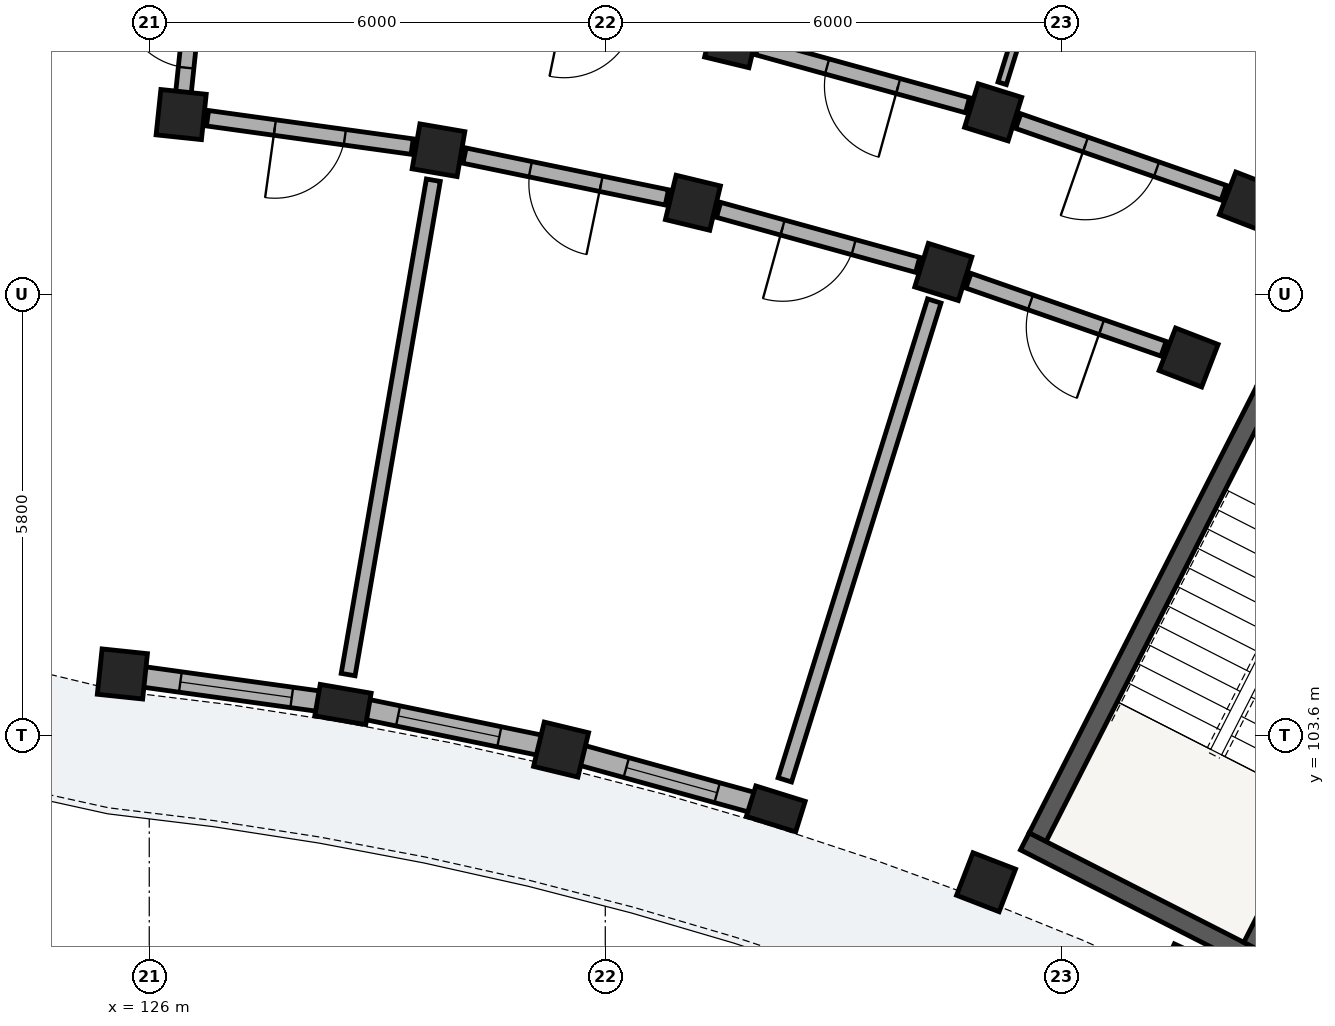
"""IFC4 building model, lengths in metres.
Left out: names, types, materials, properties, quantities, classifications, styles, units other than length and angle.
Written with IfcOpenShell. Run it as: python <this file> out.ifc"""

import sys

from ifc_helpers import new_model, si_unit, direction, frame, frame_2d, origin, origin_2d, place, context, subcontext, project, spatial, rectangle, extrude, element, fill, save


model = new_model("IFC4")
c1 = context("Model", 3, precision=1e-05, world=origin(), true_north=direction((0.0, 1.0)))
c2 = subcontext(c1, "Body", "Model", "MODEL_VIEW")
j1 = project(units=[si_unit("LENGTHUNIT", "METRE"), si_unit("PLANEANGLEUNIT", "RADIAN")], contexts=[c1])
p1 = place(None, origin())
s1 = spatial("IfcSite", under=j1, at=p1, CompositionType="ELEMENT")
p2 = place(p1, origin())
s2 = spatial("IfcBuilding", under=s1, at=p2, CompositionType="ELEMENT")
p3 = place(p2, frame((0.0, 0.0, 4.76)))
s3 = spatial("IfcBuildingStorey", under=s2, at=p3, CompositionType="ELEMENT", Elevation=4.76)
p4 = place(p3, frame((140.684, 108.139, 0.0), z_axis=(0.0, 0.0, 1.0), x_axis=(-0.453992276384, -0.891005618941, 0.0)))
e1 = element("IfcWall", 1, at=p4, inside=s3, PredefinedType="SHEAR", context=c2, shape_type="SweptSolid", body=[
    extrude(rectangle(XDim=6.6, YDim=0.25, at=frame_2d((3.3, 0.0))), origin(), (0.0, 0.0, 1.0), 3.83),
])
p5 = place(p3, frame((137.52, 102.203, 0.0), z_axis=(0.0, 0.0, 1.0), x_axis=(0.891003540237, -0.453996356025, 0.0)))
e2 = element("IfcWall", 2, at=p5, inside=s3, PredefinedType="SHEAR", context=c2, shape_type="SweptSolid", body=[
    extrude(rectangle(XDim=3.42, YDim=0.25, at=frame_2d((1.71, 0.0))), origin(), (0.0, 0.0, 1.0), 3.83),
])
p6 = place(p3, frame((143.509, 106.699, 0.0), z_axis=(0.0, 0.0, 1.0), x_axis=(-0.453992276384, -0.891005618941, 0.0)))
e3 = element("IfcWall", 3, at=p6, inside=s3, PredefinedType="SHEAR", context=c2, shape_type="SweptSolid", body=[
    extrude(rectangle(XDim=6.6, YDim=0.25, at=frame_2d((3.3, 0.0))), origin(), (0.0, 0.0, 1.0), 3.83),
])
p7 = place(p6, frame((0.22, 0.0, 0.0)))
e4 = element("IfcOpeningElement", 4, at=p7, cuts=e3, PredefinedType="OPENING", context=c2, shape_type="SweptSolid", body=[
    extrude(rectangle(XDim=1.05, YDim=2.15, at=frame_2d((0.525, 1.075))), frame((0.0, 0.135, 0.0), z_axis=(0.0, -1.0, 0.0), x_axis=(1.0, 0.0, 0.0)), (0.0, 0.0, 1.0), 0.27),
])
p8 = place(p3, frame((139.707, 100.522, 0.0), z_axis=(0.0, 0.0, 1.0), x_axis=(0.420859860775, 0.907125668024, 0.0)))
e5 = element("IfcColumn", 5, at=p8, inside=s3, PredefinedType="PILASTER", context=c2, shape_type="SweptSolid", body=[
    extrude(rectangle(XDim=0.42, YDim=0.68, at=origin_2d()), origin(), (0.0, 0.0, 1.0), 3.825),
])
for number, where, z_axis, x_axis in (
    (6, (137.01, 101.667, 0.0), (0.0, 0.0, 1.0), (0.36, 0.933, 0.0)),
    (7, (139.675, 108.57, 0.0), (0.0, 0.0, 1.0), (0.36, 0.933, 0.0)),
    (8, (140.468, 110.622, 0.0), (0.0, 0.0, 1.0), (0.36, 0.933, 0.0)),
):
    element("IfcColumn", number, at=place(p3, frame(where, z_axis=z_axis, x_axis=x_axis)), inside=s3, PredefinedType="COLUMN", context=c2, shape_type="SweptSolid", body=[
        extrude(rectangle(XDim=0.6, YDim=0.6, at=origin_2d()), origin(), (0.0, 0.0, 1.0), 3.825),
    ])
p9 = place(p3, frame((134.243, 102.631, 0.0), z_axis=(0.0, 0.0, 1.0), x_axis=(0.297930225503, 0.954587649581, 0.0)))
e9 = element("IfcColumn", 9, at=p9, inside=s3, PredefinedType="PILASTER", context=c2, shape_type="SweptSolid", body=[
    extrude(rectangle(XDim=0.42, YDim=0.68, at=origin_2d()), origin(), (0.0, 0.0, 1.0), 3.825),
])
for number, where, z_axis, x_axis in (
    (10, (136.448, 109.695, 0.0), (0.0, 0.0, 1.0), (0.298, 0.955, 0.0)),
    (11, (137.103, 111.795, 0.0), (0.0, 0.0, 1.0), (0.298, 0.955, 0.0)),
    (12, (131.418, 103.412, 0.0), (0.0, 0.0, 1.0), (0.234, 0.972, 0.0)),
    (13, (133.153, 110.606, 0.0), (0.0, 0.0, 1.0), (0.234, 0.972, 0.0)),
    (14, (133.669, 112.744, 0.0), (0.0, 0.0, 1.0), (0.234, 0.972, 0.0)),
):
    element("IfcColumn", number, at=place(p3, frame(where, z_axis=z_axis, x_axis=x_axis)), inside=s3, PredefinedType="COLUMN", context=c2, shape_type="SweptSolid", body=[
        extrude(rectangle(XDim=0.6, YDim=0.6, at=origin_2d()), origin(), (0.0, 0.0, 1.0), 3.825),
    ])
p10 = place(p3, frame((128.549, 104.004, 0.0), z_axis=(0.0, 0.0, 1.0), x_axis=(0.169827230012, 0.985473851478, 0.0)))
e15 = element("IfcColumn", 15, at=p10, inside=s3, PredefinedType="PILASTER", context=c2, shape_type="SweptSolid", body=[
    extrude(rectangle(XDim=0.42, YDim=0.68, at=origin_2d()), origin(), (0.0, 0.0, 1.0), 3.825),
])
for number, where, z_axis, x_axis in (
    (16, (129.806, 111.297, 0.0), (0.0, 0.0, 1.0), (0.17, 0.985, 0.0)),
    (17, (125.646, 104.406, 0.0), (0.0, 0.0, 1.0), (0.105, 0.995, 0.0)),
    (18, (126.42, 111.766, 0.0), (0.0, 0.0, 1.0), (0.105, 0.995, 0.0)),
):
    element("IfcColumn", number, at=place(p3, frame(where, z_axis=z_axis, x_axis=x_axis)), inside=s3, PredefinedType="COLUMN", context=c2, shape_type="SweptSolid", body=[
        extrude(rectangle(XDim=0.6, YDim=0.6, at=origin_2d()), origin(), (0.0, 0.0, 1.0), 3.825),
    ])
p11 = place(p3, frame((134.07, 102.679, 0.0), z_axis=(0.0, 0.0, 1.0), x_axis=(-0.963904687378, 0.266247542056, 0.0)))
e19 = element("IfcWall", 19, at=p11, inside=s3, PredefinedType="SOLIDWALL", context=c2, shape_type="SweptSolid", body=[
    extrude(rectangle(XDim=2.48, YDim=0.27, at=frame_2d((1.24, 0.0))), origin(), (0.0, 0.0, 1.0), 3.075),
])
p12 = place(p11, frame((0.62, 0.0, 0.55)))
e20 = element("IfcOpeningElement", 20, at=p12, cuts=e19, PredefinedType="OPENING", context=c2, shape_type="SweptSolid", body=[
    extrude(rectangle(XDim=1.24, YDim=1.535, at=frame_2d((0.62, 0.768))), frame((0.0, 0.145, 0.0), z_axis=(0.0, -1.0, 0.0), x_axis=(1.0, 0.0, 0.0)), (0.0, 0.0, 1.0), 0.29),
])
p13 = place(p3, frame((131.154, 103.466, 0.0), z_axis=(0.0, 0.0, 1.0), x_axis=(-0.979327037211, 0.202283351238, 0.0)))
e21 = element("IfcWall", 21, at=p13, inside=s3, PredefinedType="SOLIDWALL", context=c2, shape_type="SweptSolid", body=[
    extrude(rectangle(XDim=2.48, YDim=0.27, at=frame_2d((1.24, 0.0))), origin(), (0.0, 0.0, 1.0), 3.075),
])
p14 = place(p13, frame((0.56, 0.0, 0.55)))
e22 = element("IfcOpeningElement", 22, at=p14, cuts=e21, PredefinedType="OPENING", context=c2, shape_type="SweptSolid", body=[
    extrude(rectangle(XDim=1.36, YDim=1.61, at=frame_2d((0.68, 0.805))), frame((0.0, 0.145, 0.0), z_axis=(0.0, -1.0, 0.0), x_axis=(1.0, 0.0, 0.0)), (0.0, 0.0, 1.0), 0.29),
])
p15 = place(p3, frame((128.371, 104.029, 0.0), z_axis=(0.0, 0.0, 1.0), x_axis=(-0.990541017993, 0.137216951116, 0.0)))
e23 = element("IfcWall", 23, at=p15, inside=s3, PredefinedType="SOLIDWALL", context=c2, shape_type="SweptSolid", body=[
    extrude(rectangle(XDim=2.48, YDim=0.27, at=frame_2d((1.24, 0.0))), origin(), (0.0, 0.0, 1.0), 3.075),
])
p16 = place(p15, frame((0.5, 0.0, 0.55)))
e24 = element("IfcOpeningElement", 24, at=p16, cuts=e23, PredefinedType="OPENING", context=c2, shape_type="SweptSolid", body=[
    extrude(rectangle(XDim=1.48, YDim=1.46, at=frame_2d((0.74, 0.73))), frame((0.0, 0.145, 0.0), z_axis=(0.0, -1.0, 0.0), x_axis=(1.0, 0.0, 0.0)), (0.0, 0.0, 1.0), 0.29),
])
p17 = place(p3, frame((140.137, 110.738, 0.0), z_axis=(0.0, 0.0, 1.0), x_axis=(-0.944253820929, 0.329218349522, 0.0)))
e25 = element("IfcWall", 25, at=p17, inside=s3, PredefinedType="PARTITIONING", context=c2, shape_type="SweptSolid", body=[
    extrude(rectangle(XDim=2.863, YDim=0.205, at=frame_2d((1.432, 0.0))), origin(), (0.0, 0.0, 1.0), 3.09),
])
p18 = place(p17, frame((0.937, 0.0, 0.0)))
e26 = element("IfcOpeningElement", 26, at=p18, cuts=e25, PredefinedType="OPENING", context=c2, shape_type="SweptSolid", body=[
    extrude(rectangle(XDim=0.99, YDim=2.16, at=frame_2d((0.495, 1.08))), frame((0.0, 0.113, 0.0), z_axis=(0.0, -1.0, 0.0), x_axis=(1.0, 0.0, 0.0)), (0.0, 0.0, 1.0), 0.225),
])
p19 = place(p3, frame((139.345, 108.685, 0.0), z_axis=(0.0, 0.0, 1.0), x_axis=(-0.944265123647, 0.329185929627, 0.0)))
e27 = element("IfcWall", 27, at=p19, inside=s3, PredefinedType="PARTITIONING", context=c2, shape_type="SweptSolid", body=[
    extrude(rectangle(XDim=2.718, YDim=0.205, at=frame_2d((1.359, 0.0))), origin(), (0.0, 0.0, 1.0), 3.09),
])
p20 = place(p19, frame((0.864, 0.0, 0.0)))
e28 = element("IfcOpeningElement", 28, at=p20, cuts=e27, PredefinedType="OPENING", context=c2, shape_type="SweptSolid", body=[
    extrude(rectangle(XDim=0.99, YDim=2.16, at=frame_2d((0.495, 1.08))), frame((0.0, 0.113, 0.0), z_axis=(0.0, -1.0, 0.0), x_axis=(1.0, 0.0, 0.0)), (0.0, 0.0, 1.0), 0.225),
])
p21 = place(p3, frame((137.222, 112.177, 0.0), z_axis=(0.0, 0.0, 1.0), x_axis=(0.297905254614, 0.954595442726, 0.0)))
e29 = element("IfcWall", 29, at=p21, inside=s3, PredefinedType="PARTITIONING", context=c2, shape_type="SweptSolid", body=[
    extrude(rectangle(XDim=4.7, YDim=0.115, at=frame_2d((2.35, 0.0))), origin(), (0.0, 0.0, 1.0), 3.09),
])
p22 = place(p21, frame((1.895, 0.0, 0.0)))
e30 = element("IfcOpeningElement", 30, at=p22, cuts=e29, PredefinedType="OPENING", context=c2, shape_type="SweptSolid", body=[
    extrude(rectangle(XDim=0.91, YDim=2.1, at=frame_2d((0.455, 1.05))), frame((0.0, 0.067, 0.0), z_axis=(0.0, -1.0, 0.0), x_axis=(1.0, 0.0, 0.0)), (0.0, 0.0, 1.0), 0.135),
])
p23 = place(p3, frame((134.362, 103.013, 0.0), z_axis=(0.0, 0.0, 1.0), x_axis=(0.2979590431, 0.954578655028, 0.0)))
e31 = element("IfcWall", 31, at=p23, inside=s3, PredefinedType="PARTITIONING", context=c2, shape_type="SweptSolid", body=[
    extrude(rectangle(XDim=6.6, YDim=0.185, at=frame_2d((3.3, 0.0))), origin(), (0.0, 0.0, 1.0), 3.09),
])
p24 = place(p3, frame((136.766, 111.889, 0.0), z_axis=(0.0, 0.0, 1.0), x_axis=(-0.963890789093, 0.266297853356, 0.0)))
e32 = element("IfcWall", 32, at=p24, inside=s3, PredefinedType="PARTITIONING", context=c2, shape_type="SweptSolid", body=[
    extrude(rectangle(XDim=2.863, YDim=0.205, at=frame_2d((1.432, 0.0))), origin(), (0.0, 0.0, 1.0), 3.09),
])
p25 = place(p24, frame((0.947, 0.0, 0.0)))
e33 = element("IfcOpeningElement", 33, at=p25, cuts=e32, PredefinedType="OPENING", context=c2, shape_type="SweptSolid", body=[
    extrude(rectangle(XDim=0.97, YDim=2.15, at=frame_2d((0.485, 1.075))), frame((0.0, 0.113, 0.0), z_axis=(0.0, -1.0, 0.0), x_axis=(1.0, 0.0, 0.0)), (0.0, 0.0, 1.0), 0.225),
])
p26 = place(p3, frame((136.11, 109.789, 0.0), z_axis=(0.0, 0.0, 1.0), x_axis=(-0.96388375821, 0.266323301006, 0.0)))
e34 = element("IfcWall", 34, at=p26, inside=s3, PredefinedType="PARTITIONING", context=c2, shape_type="SweptSolid", body=[
    extrude(rectangle(XDim=2.718, YDim=0.205, at=frame_2d((1.359, 0.0))), origin(), (0.0, 0.0, 1.0), 3.09),
])
p27 = place(p26, frame((0.874, 0.0, 0.0)))
e35 = element("IfcOpeningElement", 35, at=p27, cuts=e34, PredefinedType="OPENING", context=c2, shape_type="SweptSolid", body=[
    extrude(rectangle(XDim=0.97, YDim=2.15, at=frame_2d((0.485, 1.075))), frame((0.0, 0.113, 0.0), z_axis=(0.0, -1.0, 0.0), x_axis=(1.0, 0.0, 0.0)), (0.0, 0.0, 1.0), 0.225),
])
p28 = place(p3, frame((132.81, 110.677, 0.0), z_axis=(0.0, 0.0, 1.0), x_axis=(-0.979349423541, 0.202174940608, 0.0)))
e36 = element("IfcWall", 36, at=p28, inside=s3, PredefinedType="PARTITIONING", context=c2, shape_type="SweptSolid", body=[
    extrude(rectangle(XDim=2.718, YDim=0.205, at=frame_2d((1.359, 0.0))), origin(), (0.0, 0.0, 1.0), 3.09),
])
p29 = place(p28, frame((0.884, 0.0, 0.0)))
e37 = element("IfcOpeningElement", 37, at=p29, cuts=e36, PredefinedType="OPENING", context=c2, shape_type="SweptSolid", body=[
    extrude(rectangle(XDim=0.95, YDim=2.13, at=frame_2d((0.475, 1.065))), frame((0.0, 0.113, 0.0), z_axis=(0.0, -1.0, 0.0), x_axis=(1.0, 0.0, 0.0)), (0.0, 0.0, 1.0), 0.225),
])
p30 = place(p3, frame((128.617, 104.398, 0.0), z_axis=(0.0, 0.0, 1.0), x_axis=(0.169825160084, 0.985474208187, 0.0)))
e38 = element("IfcWall", 38, at=p30, inside=s3, PredefinedType="PARTITIONING", context=c2, shape_type="SweptSolid", body=[
    extrude(rectangle(XDim=6.6, YDim=0.185, at=frame_2d((3.3, 0.0))), origin(), (0.0, 0.0, 1.0), 3.09),
])
p31 = place(p3, frame((129.459, 111.345, 0.0), z_axis=(0.0, 0.0, 1.0), x_axis=(-0.990535404475, 0.137257467855, 0.0)))
e39 = element("IfcWall", 39, at=p31, inside=s3, PredefinedType="PARTITIONING", context=c2, shape_type="SweptSolid", body=[
    extrude(rectangle(XDim=2.718, YDim=0.205, at=frame_2d((1.359, 0.0))), origin(), (0.0, 0.0, 1.0), 3.09),
])
p32 = place(p31, frame((0.894, 0.0, 0.0)))
e40 = element("IfcOpeningElement", 40, at=p32, cuts=e39, PredefinedType="OPENING", context=c2, shape_type="SweptSolid", body=[
    extrude(rectangle(XDim=0.93, YDim=2.12, at=frame_2d((0.465, 1.06))), frame((0.0, 0.113, 0.0), z_axis=(0.0, -1.0, 0.0), x_axis=(1.0, 0.0, 0.0)), (0.0, 0.0, 1.0), 0.225),
])
p33 = place(p3, frame((126.425, 111.816, 0.0), z_axis=(0.0, 0.0, 1.0), x_axis=(0.104509292252, 0.994523910136, 0.0)))
e41 = element("IfcWall", 41, at=p33, inside=s3, PredefinedType="PARTITIONING", context=c2, shape_type="SweptSolid", body=[
    extrude(rectangle(XDim=2.1, YDim=0.205, at=frame_2d((1.05, 0.0))), origin(), (0.0, 0.0, 1.0), 3.09),
])
p34 = place(p33, frame((0.57, 0.0, 0.0)))
e42 = element("IfcOpeningElement", 42, at=p34, cuts=e41, PredefinedType="OPENING", context=c2, shape_type="SweptSolid", body=[
    extrude(rectangle(XDim=0.95, YDim=2.13, at=frame_2d((0.475, 1.065))), frame((0.0, 0.113, 0.0), z_axis=(0.0, -1.0, 0.0), x_axis=(1.0, 0.0, 0.0)), (0.0, 0.0, 1.0), 0.225),
])
p35 = place(p12, origin())
e43 = element("IfcWindow", 43, at=p35, inside=s3, PartitioningType="SINGLE_PANEL", PredefinedType="WINDOW", context=c2, shape_type="SweptSolid", body=[
    extrude(rectangle(XDim=1.24, YDim=1.535, at=frame_2d((0.62, 0.768))), frame((0.0, 0.03, 0.0), z_axis=(0.0, -1.0, 0.0), x_axis=(1.0, 0.0, 0.0)), (0.0, 0.0, 1.0), 0.06),
])
fill(e20, e43)
p36 = place(p14, origin())
e44 = element("IfcWindow", 44, at=p36, inside=s3, PartitioningType="SINGLE_PANEL", PredefinedType="WINDOW", context=c2, shape_type="SweptSolid", body=[
    extrude(rectangle(XDim=1.36, YDim=1.61, at=frame_2d((0.68, 0.805))), frame((0.0, 0.03, 0.0), z_axis=(0.0, -1.0, 0.0), x_axis=(1.0, 0.0, 0.0)), (0.0, 0.0, 1.0), 0.06),
])
fill(e22, e44)
p37 = place(p16, origin())
e45 = element("IfcWindow", 45, at=p37, inside=s3, PartitioningType="SINGLE_PANEL", PredefinedType="WINDOW", context=c2, shape_type="SweptSolid", body=[
    extrude(rectangle(XDim=1.48, YDim=1.46, at=frame_2d((0.74, 0.73))), frame((0.0, 0.03, 0.0), z_axis=(0.0, -1.0, 0.0), x_axis=(1.0, 0.0, 0.0)), (0.0, 0.0, 1.0), 0.06),
])
fill(e24, e45)
p38 = place(p18, origin())
e46 = element("IfcDoor", 46, at=p38, inside=s3, OperationType="SINGLE_SWING_RIGHT", PredefinedType="DOOR", context=c2, shape_type="SweptSolid", body=[
    extrude(rectangle(XDim=0.99, YDim=2.16, at=frame_2d((0.495, 1.08))), frame((0.0, 0.025, 0.0), z_axis=(0.0, -1.0, 0.0), x_axis=(1.0, 0.0, 0.0)), (0.0, 0.0, 1.0), 0.05),
])
fill(e26, e46)
p39 = place(p20, origin())
e47 = element("IfcDoor", 47, at=p39, inside=s3, OperationType="SINGLE_SWING_LEFT", PredefinedType="DOOR", context=c2, shape_type="SweptSolid", body=[
    extrude(rectangle(XDim=0.99, YDim=2.16, at=frame_2d((0.495, 1.08))), frame((0.0, 0.025, 0.0), z_axis=(0.0, -1.0, 0.0), x_axis=(1.0, 0.0, 0.0)), (0.0, 0.0, 1.0), 0.05),
])
fill(e28, e47)
p40 = place(p25, origin())
e48 = element("IfcDoor", 48, at=p40, inside=s3, OperationType="SINGLE_SWING_LEFT", PredefinedType="DOOR", context=c2, shape_type="SweptSolid", body=[
    extrude(rectangle(XDim=0.97, YDim=2.15, at=frame_2d((0.485, 1.075))), frame((0.0, 0.025, 0.0), z_axis=(0.0, -1.0, 0.0), x_axis=(1.0, 0.0, 0.0)), (0.0, 0.0, 1.0), 0.05),
])
fill(e33, e48)
p41 = place(p27, origin())
e49 = element("IfcDoor", 49, at=p41, inside=s3, OperationType="SINGLE_SWING_RIGHT", PredefinedType="DOOR", context=c2, shape_type="SweptSolid", body=[
    extrude(rectangle(XDim=0.97, YDim=2.15, at=frame_2d((0.485, 1.075))), frame((0.0, 0.025, 0.0), z_axis=(0.0, -1.0, 0.0), x_axis=(1.0, 0.0, 0.0)), (0.0, 0.0, 1.0), 0.05),
])
fill(e35, e49)
p42 = place(p29, origin())
e50 = element("IfcDoor", 50, at=p42, inside=s3, OperationType="SINGLE_SWING_LEFT", PredefinedType="DOOR", context=c2, shape_type="SweptSolid", body=[
    extrude(rectangle(XDim=0.95, YDim=2.13, at=frame_2d((0.475, 1.065))), frame((0.0, 0.025, 0.0), z_axis=(0.0, -1.0, 0.0), x_axis=(1.0, 0.0, 0.0)), (0.0, 0.0, 1.0), 0.05),
])
fill(e37, e50)
p43 = place(p32, origin())
e51 = element("IfcDoor", 51, at=p43, inside=s3, OperationType="SINGLE_SWING_RIGHT", PredefinedType="DOOR", context=c2, shape_type="SweptSolid", body=[
    extrude(rectangle(XDim=0.93, YDim=2.12, at=frame_2d((0.465, 1.06))), frame((0.0, 0.025, 0.0), z_axis=(0.0, -1.0, 0.0), x_axis=(1.0, 0.0, 0.0)), (0.0, 0.0, 1.0), 0.05),
])
fill(e40, e51)
p44 = place(p34, origin())
e52 = element("IfcDoor", 52, at=p44, inside=s3, OperationType="SINGLE_SWING_RIGHT", PredefinedType="DOOR", context=c2, shape_type="SweptSolid", body=[
    extrude(rectangle(XDim=0.95, YDim=2.13, at=frame_2d((0.475, 1.065))), frame((0.0, 0.025, 0.0), z_axis=(0.0, -1.0, 0.0), x_axis=(1.0, 0.0, 0.0)), (0.0, 0.0, 1.0), 0.05),
])
fill(e42, e52)
save(model, sys.argv[1])
